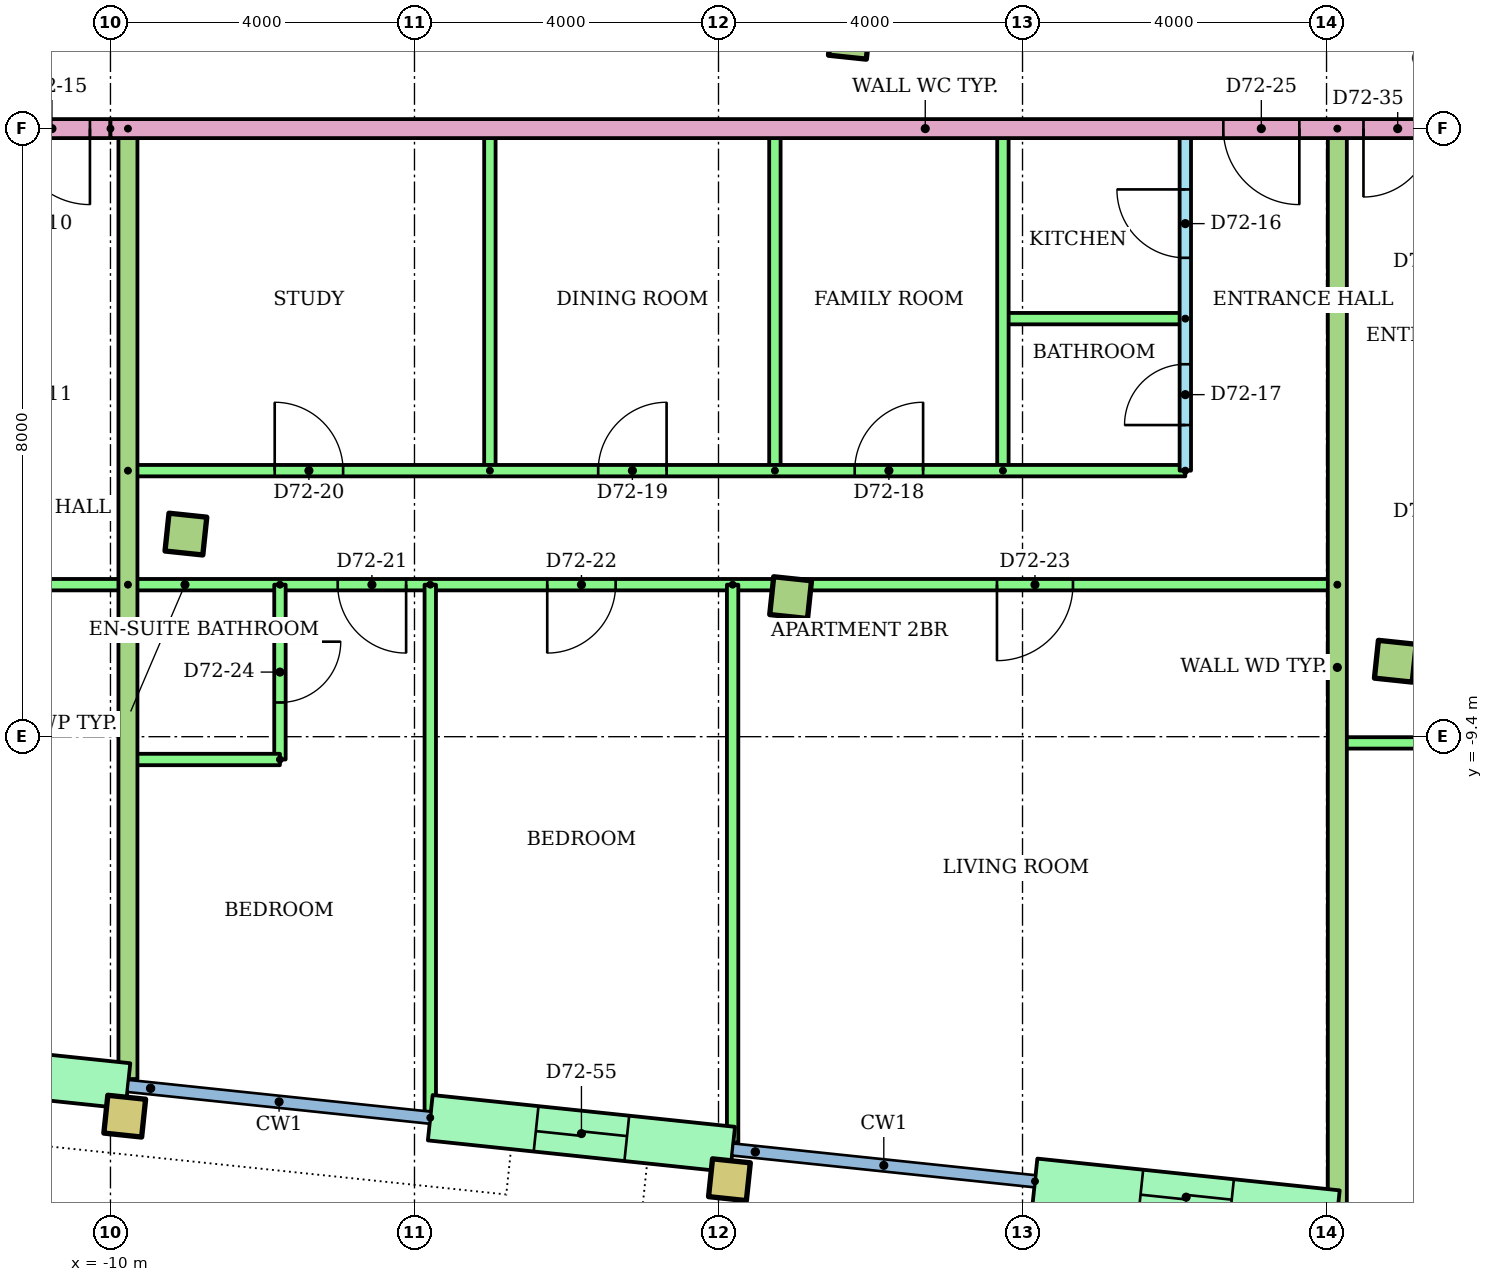
"""IFC4 building model, lengths in metres.
Left out: names, types, materials, properties, quantities, classifications, styles, units other than length and angle.
Written with IfcOpenShell. Run it as: python <this file> out.ifc"""

import sys

from ifc_helpers import new_model, si_unit, direction, frame, frame_2d, origin, origin_2d, place, context, subcontext, project, spatial, rectangle, hollow_rectangle, extrude, element, fill, save


model = new_model("IFC4")
c1 = context("Model", 3, precision=1e-05, world=origin(), true_north=direction((0.0, 1.0)))
c2 = subcontext(c1, "Body", "Model", "MODEL_VIEW")
j1 = project(units=[si_unit("LENGTHUNIT", "METRE"), si_unit("PLANEANGLEUNIT", "RADIAN")], contexts=[c1])
p1 = place(None, origin())
s1 = spatial("IfcSite", under=j1, at=p1, CompositionType="ELEMENT")
p2 = place(p1, origin())
s2 = spatial("IfcBuilding", under=s1, at=p2, CompositionType="ELEMENT")
p3 = place(p2, frame((0.0, 0.0, 275.5)))
s3 = spatial("IfcBuildingStorey", under=s2, at=p3, CompositionType="ELEMENT", Elevation=275.5)
for number, where, z_axis, x_axis in (
    (1, (-9.812, -14.392, 0.0), (0.0, 0.0, 1.0), (0.995, -0.105, 0.0)),
    (2, (-1.856, -15.229, 0.0), (0.0, 0.0, 1.0), (0.995, -0.105, 0.0)),
):
    element("IfcColumn", number, at=place(p3, frame(where, z_axis=z_axis, x_axis=x_axis)), inside=s3, PredefinedType="COLUMN", context=c2, shape_type="SweptSolid", body=[
        extrude(hollow_rectangle(XDim=0.5, YDim=0.5, WallThickness=0.025, at=origin_2d()), origin(), (0.0, 0.0, 1.0), 3.2),
    ])
for number, where, z_axis, x_axis in (
    (3, (-9.007, -6.735, 0.0), (0.0, 0.0, 1.0), (0.995, -0.105, 0.0)),
    (4, (-1.051, -7.571, 0.0), (0.0, 0.0, 1.0), (0.995, -0.105, 0.0)),
    (5, (6.905, -8.407, 0.0), (0.0, 0.0, 1.0), (0.995, -0.105, 0.0)),
    (6, (-0.278, -0.211, 0.0), (0.0, 0.0, 1.0), (0.995, -0.105, 0.0)),
):
    element("IfcColumn", number, at=place(p3, frame(where, z_axis=z_axis, x_axis=x_axis)), inside=s3, PredefinedType="COLUMN", context=c2, shape_type="SweptSolid", body=[
        extrude(rectangle(XDim=0.5, YDim=0.5, at=origin_2d()), origin(), (0.0, 0.0, 1.0), 3.2),
    ])
p4 = place(p3, frame((-13.749, -13.576, 0.0), z_axis=(0.0, 0.0, 1.0), x_axis=(0.994519156568, -0.104554517933, 0.0)))
e7 = element("IfcWall", 7, at=p4, inside=s3, PredefinedType="STANDARD", context=c2, shape_type="SweptSolid", body=[
    extrude(rectangle(XDim=4.0, YDim=0.6, at=frame_2d((2.0, 0.0))), origin(), (0.0, 0.0, 1.0), 2.92),
])
p5 = place(p4, frame((1.4, 0.0, 0.0)))
e8 = element("IfcOpeningElement", 8, at=p5, cuts=e7, PredefinedType="OPENING", context=c2, shape_type="SweptSolid", body=[
    extrude(rectangle(XDim=1.2, YDim=2.1, at=frame_2d((0.6, 1.05))), frame((0.0, 0.31, 0.0), z_axis=(0.0, -1.0, 0.0), x_axis=(1.0, 0.0, 0.0)), (0.0, 0.0, 1.0), 0.62),
])
p6 = place(p3, frame((-5.792, -14.413, 0.0), z_axis=(0.0, 0.0, 1.0), x_axis=(0.99452550138, -0.104494148666, 0.0)))
e9 = element("IfcWall", 9, at=p6, inside=s3, PredefinedType="STANDARD", context=c2, shape_type="SweptSolid", body=[
    extrude(rectangle(XDim=4.0, YDim=0.6, at=frame_2d((2.0, 0.0))), origin(), (0.0, 0.0, 1.0), 2.92),
])
p7 = place(p6, frame((1.4, 0.0, 0.0)))
e10 = element("IfcOpeningElement", 10, at=p7, cuts=e9, PredefinedType="OPENING", context=c2, shape_type="SweptSolid", body=[
    extrude(rectangle(XDim=1.2, YDim=2.1, at=frame_2d((0.6, 1.05))), frame((0.0, 0.31, 0.0), z_axis=(0.0, -1.0, 0.0), x_axis=(1.0, 0.0, 0.0)), (0.0, 0.0, 1.0), 0.62),
])
p8 = place(p3, frame((2.164, -15.249, 0.0), z_axis=(0.0, 0.0, 1.0), x_axis=(0.99452550138, -0.104494148666, 0.0)))
e11 = element("IfcWall", 11, at=p8, inside=s3, PredefinedType="STANDARD", context=c2, shape_type="SweptSolid", body=[
    extrude(rectangle(XDim=4.0, YDim=0.6, at=frame_2d((2.0, 0.0))), origin(), (0.0, 0.0, 1.0), 2.92),
])
p9 = place(p8, frame((1.4, 0.0, 0.0)))
e12 = element("IfcOpeningElement", 12, at=p9, cuts=e11, PredefinedType="OPENING", context=c2, shape_type="SweptSolid", body=[
    extrude(rectangle(XDim=1.2, YDim=2.1, at=frame_2d((0.6, 1.05))), frame((0.0, 0.31, 0.0), z_axis=(0.0, -1.0, 0.0), x_axis=(1.0, 0.0, 0.0)), (0.0, 0.0, 1.0), 0.62),
])
p10 = place(p3, frame((-9.77, -7.4, 0.0), z_axis=(0.0, 0.0, 1.0), x_axis=(-1.0, 0.0, 0.0)))
e13 = element("IfcWall", 13, at=p10, inside=s3, PredefinedType="PARTITIONING", context=c2, shape_type="SweptSolid", body=[
    extrude(rectangle(XDim=14.411, YDim=0.15, at=frame_2d((7.206, 0.0))), origin(), (0.0, 0.0, 1.0), 2.4),
])
p11 = place(p10, frame((5.789, 0.0, 0.0)))
e14 = element("IfcOpeningElement", 14, at=p11, cuts=e13, PredefinedType="OPENING", context=c2, shape_type="SweptSolid", body=[
    extrude(rectangle(XDim=1.0, YDim=2.1, at=frame_2d((0.5, 1.05))), frame((0.0, 0.085, 0.0), z_axis=(0.0, -1.0, 0.0), x_axis=(1.0, 0.0, 0.0)), (0.0, 0.0, 1.0), 0.17),
])
p12 = place(p3, frame((4.142, -5.9, 0.0), z_axis=(0.0, 0.0, 1.0), x_axis=(0.0, 1.0, 0.0)))
e15 = element("IfcWall", 15, at=p12, inside=s3, PredefinedType="PARTITIONING", context=c2, shape_type="SweptSolid", body=[
    extrude(rectangle(XDim=4.5, YDim=0.15, at=frame_2d((2.25, 0.0))), origin(), (0.0, 0.0, 1.0), 2.4),
])
p13 = place(p12, frame((2.8, 0.0, 0.0)))
e16 = element("IfcOpeningElement", 16, at=p13, cuts=e15, PredefinedType="OPENING", context=c2, shape_type="SweptSolid", body=[
    extrude(rectangle(XDim=0.9, YDim=2.1, at=frame_2d((0.45, 1.05))), frame((0.0, 0.085, 0.0), z_axis=(0.0, -1.0, 0.0), x_axis=(1.0, 0.0, 0.0)), (0.0, 0.0, 1.0), 0.17),
])
p14 = place(p12, frame((0.6, 0.0, 0.0)))
e17 = element("IfcOpeningElement", 17, at=p14, cuts=e15, PredefinedType="OPENING", context=c2, shape_type="SweptSolid", body=[
    extrude(rectangle(XDim=0.8, YDim=2.1, at=frame_2d((0.4, 1.05))), frame((0.0, 0.085, 0.0), z_axis=(0.0, -1.0, 0.0), x_axis=(1.0, 0.0, 0.0)), (0.0, 0.0, 1.0), 0.17),
])
p15 = place(p3, frame((4.142, -3.9, 0.0), z_axis=(0.0, 0.0, 1.0), x_axis=(-1.0, 0.0, 0.0)))
e18 = element("IfcWall", 18, at=p15, inside=s3, PredefinedType="PARTITIONING", context=c2, shape_type="SweptSolid", body=[
    extrude(rectangle(XDim=2.4, YDim=0.15, at=frame_2d((1.2, 0.0))), origin(), (0.0, 0.0, 1.0), 2.4),
])
for number, where, z_axis, x_axis in (
    (19, (1.742, -5.9, 0.0), (0.0, 0.0, 1.0), (0.0, 1.0, 0.0)),
    (20, (-1.258, -5.9, 0.0), (0.0, 0.0, 1.0), (0.0, 1.0, 0.0)),
    (21, (-5.008, -5.9, 0.0), (0.0, 0.0, 1.0), (0.0, 1.0, 0.0)),
):
    element("IfcWall", number, at=place(p3, frame(where, z_axis=z_axis, x_axis=x_axis)), inside=s3, PredefinedType="PARTITIONING", context=c2, shape_type="SweptSolid", body=[
        extrude(rectangle(XDim=4.5, YDim=0.15, at=frame_2d((2.25, 0.0))), origin(), (0.0, 0.0, 1.0), 2.4),
    ])
p16 = place(p3, frame((-9.77, -5.9, 0.0)))
e22 = element("IfcWall", 22, at=p16, inside=s3, PredefinedType="PARTITIONING", context=c2, shape_type="SweptSolid", body=[
    extrude(rectangle(XDim=13.912, YDim=0.15, at=frame_2d((6.956, 0.0))), origin(), (0.0, 0.0, 1.0), 2.4),
])
p17 = place(p16, frame((9.562, 0.0, 0.0)))
e23 = element("IfcOpeningElement", 23, at=p17, cuts=e22, PredefinedType="OPENING", context=c2, shape_type="SweptSolid", body=[
    extrude(rectangle(XDim=0.9, YDim=2.1, at=frame_2d((0.45, 1.05))), frame((0.0, 0.085, 0.0), z_axis=(0.0, -1.0, 0.0), x_axis=(1.0, 0.0, 0.0)), (0.0, 0.0, 1.0), 0.17),
])
p18 = place(p16, frame((6.187, 0.0, 0.0)))
e24 = element("IfcOpeningElement", 24, at=p18, cuts=e22, PredefinedType="OPENING", context=c2, shape_type="SweptSolid", body=[
    extrude(rectangle(XDim=0.9, YDim=2.1, at=frame_2d((0.45, 1.05))), frame((0.0, 0.085, 0.0), z_axis=(0.0, -1.0, 0.0), x_axis=(1.0, 0.0, 0.0)), (0.0, 0.0, 1.0), 0.17),
])
p19 = place(p16, frame((1.931, 0.0, 0.0)))
e25 = element("IfcOpeningElement", 25, at=p19, cuts=e22, PredefinedType="OPENING", context=c2, shape_type="SweptSolid", body=[
    extrude(rectangle(XDim=0.9, YDim=2.1, at=frame_2d((0.45, 1.05))), frame((0.0, 0.085, 0.0), z_axis=(0.0, -1.0, 0.0), x_axis=(1.0, 0.0, 0.0)), (0.0, 0.0, 1.0), 0.17),
])
p20 = place(p3, frame((6.142, -7.4, 0.0), z_axis=(0.0, 0.0, 1.0), x_axis=(-1.0, 0.0, 0.0)))
e26 = element("IfcWall", 26, at=p20, inside=s3, PredefinedType="PARTITIONING", context=c2, shape_type="SweptSolid", body=[
    extrude(rectangle(XDim=15.912, YDim=0.15, at=frame_2d((7.956, 0.0))), origin(), (0.0, 0.0, 1.0), 2.4),
])
p21 = place(p20, frame((12.252, 0.0, 0.0)))
e27 = element("IfcOpeningElement", 27, at=p21, cuts=e26, PredefinedType="OPENING", context=c2, shape_type="SweptSolid", body=[
    extrude(rectangle(XDim=0.9, YDim=2.1, at=frame_2d((0.45, 1.05))), frame((0.0, 0.085, 0.0), z_axis=(0.0, -1.0, 0.0), x_axis=(1.0, 0.0, 0.0)), (0.0, 0.0, 1.0), 0.17),
])
p22 = place(p20, frame((9.495, 0.0, 0.0)))
e28 = element("IfcOpeningElement", 28, at=p22, cuts=e26, PredefinedType="OPENING", context=c2, shape_type="SweptSolid", body=[
    extrude(rectangle(XDim=0.9, YDim=2.1, at=frame_2d((0.45, 1.05))), frame((0.0, 0.085, 0.0), z_axis=(0.0, -1.0, 0.0), x_axis=(1.0, 0.0, 0.0)), (0.0, 0.0, 1.0), 0.17),
])
p23 = place(p20, frame((3.478, 0.0, 0.0)))
e29 = element("IfcOpeningElement", 29, at=p23, cuts=e26, PredefinedType="OPENING", context=c2, shape_type="SweptSolid", body=[
    extrude(rectangle(XDim=1.0, YDim=2.1, at=frame_2d((0.5, 1.05))), frame((0.0, 0.085, 0.0), z_axis=(0.0, -1.0, 0.0), x_axis=(1.0, 0.0, 0.0)), (0.0, 0.0, 1.0), 0.17),
])
p24 = place(p3, frame((-5.792, -7.4, 0.0), z_axis=(0.0, 0.0, 1.0), x_axis=(0.0, -1.0, 0.0)))
e30 = element("IfcWall", 30, at=p24, inside=s3, PredefinedType="PARTITIONING", context=c2, shape_type="SweptSolid", body=[
    extrude(rectangle(XDim=6.933, YDim=0.15, at=frame_2d((3.467, 0.0))), origin(), (0.0, 0.0, 1.0), 2.4),
])
p25 = place(p3, frame((-1.814, -7.4, 0.0), z_axis=(0.0, 0.0, 1.0), x_axis=(0.0, -1.0, 0.0)))
e31 = element("IfcWall", 31, at=p25, inside=s3, PredefinedType="PARTITIONING", context=c2, shape_type="SweptSolid", body=[
    extrude(rectangle(XDim=7.341, YDim=0.15, at=frame_2d((3.67, 0.0))), origin(), (0.0, 0.0, 1.0), 2.4),
])
p26 = place(p3, frame((-7.77, -7.4, 0.0), z_axis=(0.0, 0.0, 1.0), x_axis=(0.0, -1.0, 0.0)))
e32 = element("IfcWall", 32, at=p26, inside=s3, PredefinedType="PARTITIONING", context=c2, shape_type="SweptSolid", body=[
    extrude(rectangle(XDim=2.3, YDim=0.15, at=frame_2d((1.15, 0.0))), origin(), (0.0, 0.0, 1.0), 2.4),
])
p27 = place(p26, frame((0.75, 0.0, 0.0)))
e33 = element("IfcOpeningElement", 33, at=p27, cuts=e32, PredefinedType="OPENING", context=c2, shape_type="SweptSolid", body=[
    extrude(rectangle(XDim=0.8, YDim=2.1, at=frame_2d((0.4, 1.05))), frame((0.0, 0.085, 0.0), z_axis=(0.0, -1.0, 0.0), x_axis=(1.0, 0.0, 0.0)), (0.0, 0.0, 1.0), 0.17),
])
p28 = place(p3, frame((-7.77, -9.7, 0.0), z_axis=(0.0, 0.0, 1.0), x_axis=(-1.0, 0.0, 0.0)))
e34 = element("IfcWall", 34, at=p28, inside=s3, PredefinedType="PARTITIONING", context=c2, shape_type="SweptSolid", body=[
    extrude(rectangle(XDim=2.0, YDim=0.15, at=frame_2d((1.0, 0.0))), origin(), (0.0, 0.0, 1.0), 2.4),
])
p29 = place(p3, frame((-9.77, -1.4, 0.0), z_axis=(0.0, 0.0, 1.0), x_axis=(0.0, -1.0, 0.0)))
e35 = element("IfcWall", 35, at=p29, inside=s3, PredefinedType="PARTITIONING", context=c2, shape_type="SweptSolid", body=[
    extrude(rectangle(XDim=12.504, YDim=0.25, at=frame_2d((6.252, 0.0))), origin(), (0.0, 0.0, 1.0), 2.4),
])
p30 = place(p3, frame((29.94, -9.482, 0.0), z_axis=(0.0, 0.0, 1.0), x_axis=(-1.0, 0.0, 0.0)))
e36 = element("IfcWall", 36, at=p30, inside=s3, PredefinedType="PARTITIONING", context=c2, shape_type="SweptSolid", body=[
    extrude(rectangle(XDim=23.798, YDim=0.15, at=frame_2d((11.899, 0.0))), origin(), (0.0, 0.0, 1.0), 2.4),
])
p31 = place(p30, frame((19.32, 0.0, 0.0)))
e37 = element("IfcOpeningElement", 37, at=p31, cuts=e36, PredefinedType="OPENING", context=c2, shape_type="SweptSolid", body=[
    extrude(rectangle(XDim=1.0, YDim=2.1, at=frame_2d((0.5, 1.05))), frame((0.0, 0.085, 0.0), z_axis=(0.0, -1.0, 0.0), x_axis=(1.0, 0.0, 0.0)), (0.0, 0.0, 1.0), 0.17),
])
p32 = place(p30, frame((13.403, 0.0, 0.0)))
e38 = element("IfcOpeningElement", 38, at=p32, cuts=e36, PredefinedType="OPENING", context=c2, shape_type="SweptSolid", body=[
    extrude(rectangle(XDim=0.9, YDim=2.1, at=frame_2d((0.45, 1.05))), frame((0.0, 0.085, 0.0), z_axis=(0.0, -1.0, 0.0), x_axis=(1.0, 0.0, 0.0)), (0.0, 0.0, 1.0), 0.17),
])
p33 = place(p30, frame((9.425, 0.0, 0.0)))
e39 = element("IfcOpeningElement", 39, at=p33, cuts=e36, PredefinedType="OPENING", context=c2, shape_type="SweptSolid", body=[
    extrude(rectangle(XDim=0.9, YDim=2.1, at=frame_2d((0.45, 1.05))), frame((0.0, 0.085, 0.0), z_axis=(0.0, -1.0, 0.0), x_axis=(1.0, 0.0, 0.0)), (0.0, 0.0, 1.0), 0.17),
])
p34 = place(p30, frame((2.434, 0.0, 0.0)))
e40 = element("IfcOpeningElement", 40, at=p34, cuts=e36, PredefinedType="OPENING", context=c2, shape_type="SweptSolid", body=[
    extrude(rectangle(XDim=0.9, YDim=2.1, at=frame_2d((0.45, 1.05))), frame((0.0, 0.085, 0.0), z_axis=(0.0, -1.0, 0.0), x_axis=(1.0, 0.0, 0.0)), (0.0, 0.0, 1.0), 0.17),
])
p35 = place(p3, frame((6.142, -1.4, 0.0), z_axis=(0.0, 0.0, 1.0), x_axis=(0.0, -1.0, 0.0)))
e41 = element("IfcWall", 41, at=p35, inside=s3, PredefinedType="PARTITIONING", context=c2, shape_type="SweptSolid", body=[
    extrude(rectangle(XDim=14.177, YDim=0.25, at=frame_2d((7.088, 0.0))), origin(), (0.0, 0.0, 1.0), 2.4),
])
p36 = place(p3, frame((-10.0, -1.4, 0.0), z_axis=(0.0, 0.0, 1.0), x_axis=(-1.0, 0.0, 0.0)))
e42 = element("IfcWall", 42, at=p36, inside=s3, PredefinedType="PARTITIONING", context=c2, shape_type="SweptSolid", body=[
    extrude(rectangle(XDim=13.56, YDim=0.25, at=frame_2d((6.78, 0.0))), origin(), (0.0, 0.0, 1.0), 2.4),
])
p37 = place(p36, frame((0.27, 0.0, 0.0)))
e43 = element("IfcOpeningElement", 43, at=p37, cuts=e42, PredefinedType="OPENING", context=c2, shape_type="SweptSolid", body=[
    extrude(rectangle(XDim=1.0, YDim=2.1, at=frame_2d((0.5, 1.05))), frame((0.0, 0.135, 0.0), z_axis=(0.0, -1.0, 0.0), x_axis=(1.0, 0.0, 0.0)), (0.0, 0.0, 1.0), 0.27),
])
p38 = place(p3, frame((10.0, -1.4, 0.0), z_axis=(0.0, 0.0, 1.0), x_axis=(-1.0, 0.0, 0.0)))
e44 = element("IfcWall", 44, at=p38, inside=s3, PredefinedType="PARTITIONING", context=c2, shape_type="SweptSolid", body=[
    extrude(rectangle(XDim=20.0, YDim=0.25, at=frame_2d((10.0, 0.0))), origin(), (0.0, 0.0, 1.0), 2.4),
])
p39 = place(p38, frame((4.358, 0.0, 0.0)))
e45 = element("IfcOpeningElement", 45, at=p39, cuts=e44, PredefinedType="OPENING", context=c2, shape_type="SweptSolid", body=[
    extrude(rectangle(XDim=1.0, YDim=2.1, at=frame_2d((0.5, 1.05))), frame((0.0, 0.135, 0.0), z_axis=(0.0, -1.0, 0.0), x_axis=(1.0, 0.0, 0.0)), (0.0, 0.0, 1.0), 0.27),
])
p40 = place(p38, frame((2.614, 0.0, 0.0)))
e46 = element("IfcOpeningElement", 46, at=p40, cuts=e44, PredefinedType="OPENING", context=c2, shape_type="SweptSolid", body=[
    extrude(rectangle(XDim=0.9, YDim=2.1, at=frame_2d((0.45, 1.05))), frame((0.0, 0.135, 0.0), z_axis=(0.0, -1.0, 0.0), x_axis=(1.0, 0.0, 0.0)), (0.0, 0.0, 1.0), 0.27),
])
p41 = place(p37, origin())
e47 = element("IfcDoor", 47, at=p41, inside=s3, OperationType="SINGLE_SWING_LEFT", PredefinedType="DOOR", context=c2, shape_type="SweptSolid", body=[
    extrude(rectangle(XDim=1.0, YDim=2.1, at=frame_2d((0.5, 1.05))), frame((0.0, 0.025, 0.0), z_axis=(0.0, -1.0, 0.0), x_axis=(1.0, 0.0, 0.0)), (0.0, 0.0, 1.0), 0.05),
])
fill(e43, e47)
p42 = place(p13, origin())
e48 = element("IfcDoor", 48, at=p42, inside=s3, OperationType="SINGLE_SWING_RIGHT", PredefinedType="DOOR", context=c2, shape_type="SweptSolid", body=[
    extrude(rectangle(XDim=0.9, YDim=2.1, at=frame_2d((0.45, 1.05))), frame((0.0, 0.025, 0.0), z_axis=(0.0, -1.0, 0.0), x_axis=(1.0, 0.0, 0.0)), (0.0, 0.0, 1.0), 0.05),
])
fill(e16, e48)
p43 = place(p14, origin())
e49 = element("IfcDoor", 49, at=p43, inside=s3, OperationType="SINGLE_SWING_LEFT", PredefinedType="DOOR", context=c2, shape_type="SweptSolid", body=[
    extrude(rectangle(XDim=0.8, YDim=2.1, at=frame_2d((0.4, 1.05))), frame((0.0, 0.025, 0.0), z_axis=(0.0, -1.0, 0.0), x_axis=(1.0, 0.0, 0.0)), (0.0, 0.0, 1.0), 0.05),
])
fill(e17, e49)
p44 = place(p17, origin())
e50 = element("IfcDoor", 50, at=p44, inside=s3, OperationType="SINGLE_SWING_RIGHT", PredefinedType="DOOR", context=c2, shape_type="SweptSolid", body=[
    extrude(rectangle(XDim=0.9, YDim=2.1, at=frame_2d((0.45, 1.05))), frame((0.0, 0.025, 0.0), z_axis=(0.0, -1.0, 0.0), x_axis=(1.0, 0.0, 0.0)), (0.0, 0.0, 1.0), 0.05),
])
fill(e23, e50)
p45 = place(p18, origin())
e51 = element("IfcDoor", 51, at=p45, inside=s3, OperationType="SINGLE_SWING_RIGHT", PredefinedType="DOOR", context=c2, shape_type="SweptSolid", body=[
    extrude(rectangle(XDim=0.9, YDim=2.1, at=frame_2d((0.45, 1.05))), frame((0.0, 0.025, 0.0), z_axis=(0.0, -1.0, 0.0), x_axis=(1.0, 0.0, 0.0)), (0.0, 0.0, 1.0), 0.05),
])
fill(e24, e51)
p46 = place(p19, origin())
e52 = element("IfcDoor", 52, at=p46, inside=s3, OperationType="SINGLE_SWING_LEFT", PredefinedType="DOOR", context=c2, shape_type="SweptSolid", body=[
    extrude(rectangle(XDim=0.9, YDim=2.1, at=frame_2d((0.45, 1.05))), frame((0.0, 0.025, 0.0), z_axis=(0.0, -1.0, 0.0), x_axis=(1.0, 0.0, 0.0)), (0.0, 0.0, 1.0), 0.05),
])
fill(e25, e52)
p47 = place(p21, origin())
e53 = element("IfcDoor", 53, at=p47, inside=s3, OperationType="SINGLE_SWING_LEFT", PredefinedType="DOOR", context=c2, shape_type="SweptSolid", body=[
    extrude(rectangle(XDim=0.9, YDim=2.1, at=frame_2d((0.45, 1.05))), frame((0.0, 0.025, 0.0), z_axis=(0.0, -1.0, 0.0), x_axis=(1.0, 0.0, 0.0)), (0.0, 0.0, 1.0), 0.05),
])
fill(e27, e53)
p48 = place(p22, origin())
e54 = element("IfcDoor", 54, at=p48, inside=s3, OperationType="SINGLE_SWING_RIGHT", PredefinedType="DOOR", context=c2, shape_type="SweptSolid", body=[
    extrude(rectangle(XDim=0.9, YDim=2.1, at=frame_2d((0.45, 1.05))), frame((0.0, 0.025, 0.0), z_axis=(0.0, -1.0, 0.0), x_axis=(1.0, 0.0, 0.0)), (0.0, 0.0, 1.0), 0.05),
])
fill(e28, e54)
p49 = place(p23, origin())
e55 = element("IfcDoor", 55, at=p49, inside=s3, OperationType="SINGLE_SWING_RIGHT", PredefinedType="DOOR", context=c2, shape_type="SweptSolid", body=[
    extrude(rectangle(XDim=1.0, YDim=2.1, at=frame_2d((0.5, 1.05))), frame((0.0, 0.025, 0.0), z_axis=(0.0, -1.0, 0.0), x_axis=(1.0, 0.0, 0.0)), (0.0, 0.0, 1.0), 0.05),
])
fill(e29, e55)
p50 = place(p27, origin())
e56 = element("IfcDoor", 56, at=p50, inside=s3, OperationType="SINGLE_SWING_LEFT", PredefinedType="DOOR", context=c2, shape_type="SweptSolid", body=[
    extrude(rectangle(XDim=0.8, YDim=2.1, at=frame_2d((0.4, 1.05))), frame((0.0, 0.025, 0.0), z_axis=(0.0, -1.0, 0.0), x_axis=(1.0, 0.0, 0.0)), (0.0, 0.0, 1.0), 0.05),
])
fill(e33, e56)
p51 = place(p39, origin())
e57 = element("IfcDoor", 57, at=p51, inside=s3, OperationType="SINGLE_SWING_LEFT", PredefinedType="DOOR", context=c2, shape_type="SweptSolid", body=[
    extrude(rectangle(XDim=1.0, YDim=2.1, at=frame_2d((0.5, 1.05))), frame((0.0, 0.025, 0.0), z_axis=(0.0, -1.0, 0.0), x_axis=(1.0, 0.0, 0.0)), (0.0, 0.0, 1.0), 0.05),
])
fill(e45, e57)
p52 = place(p40, origin())
e58 = element("IfcDoor", 58, at=p52, inside=s3, OperationType="SINGLE_SWING_RIGHT", PredefinedType="DOOR", context=c2, shape_type="SweptSolid", body=[
    extrude(rectangle(XDim=0.9, YDim=2.1, at=frame_2d((0.45, 1.05))), frame((0.0, 0.025, 0.0), z_axis=(0.0, -1.0, 0.0), x_axis=(1.0, 0.0, 0.0)), (0.0, 0.0, 1.0), 0.05),
])
fill(e46, e58)
p53 = place(p7, origin())
e59 = element("IfcDoor", 59, at=p53, inside=s3, OperationType="SLIDING_TO_LEFT", PredefinedType="DOOR", context=c2, shape_type="SweptSolid", body=[
    extrude(rectangle(XDim=1.2, YDim=2.1, at=frame_2d((0.6, 1.05))), frame((0.0, 0.025, 0.0), z_axis=(0.0, -1.0, 0.0), x_axis=(1.0, 0.0, 0.0)), (0.0, 0.0, 1.0), 0.05),
])
fill(e10, e59)
p54 = place(p9, origin())
e60 = element("IfcDoor", 60, at=p54, inside=s3, OperationType="SLIDING_TO_LEFT", PredefinedType="DOOR", context=c2, shape_type="SweptSolid", body=[
    extrude(rectangle(XDim=1.2, YDim=2.1, at=frame_2d((0.6, 1.05))), frame((0.0, 0.025, 0.0), z_axis=(0.0, -1.0, 0.0), x_axis=(1.0, 0.0, 0.0)), (0.0, 0.0, 1.0), 0.05),
])
fill(e12, e60)
save(model, sys.argv[1])
